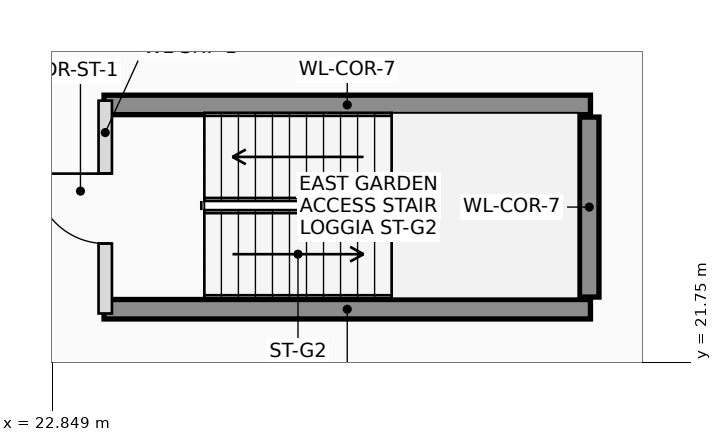
"""IFC4 building model, lengths in metres.
Left out: names, types, materials, properties, quantities, classifications, styles, units other than length and angle.
Written with IfcOpenShell. Run it as: python <this file> out.ifc"""

import sys

from ifc_helpers import new_model, si_unit, direction, frame, frame_2d, origin, place, context, subcontext, project, spatial, rectangle, extrude, element, fill, save


model = new_model("IFC4")
c1 = context("Model", 3, precision=1e-05, world=origin(), true_north=direction((0.0, 1.0)))
c2 = subcontext(c1, "Body", "Model", "MODEL_VIEW")
j1 = project(units=[si_unit("LENGTHUNIT", "METRE"), si_unit("PLANEANGLEUNIT", "RADIAN")], contexts=[c1])
p1 = place(None, origin())
s1 = spatial("IfcSite", under=j1, at=p1, CompositionType="ELEMENT")
p2 = place(p1, origin())
s2 = spatial("IfcBuilding", under=s1, at=p2, CompositionType="ELEMENT")
p3 = place(p2, frame((0.0, 0.0, 8.4)))
s3 = spatial("IfcBuildingStorey", under=s2, at=p3, CompositionType="ELEMENT", Elevation=8.4)
for number, where, z_axis, x_axis in (
    (1, (23.7, 25.98, 0.0), (0.0, 0.0, 1.0), (1.0, 0.0, 0.0)),
    (2, (23.7, 22.62, 0.0), (0.0, 0.0, 1.0), (1.0, 0.0, 0.0)),
):
    element("IfcWall", number, at=place(p3, frame(where, z_axis=z_axis, x_axis=x_axis)), inside=s3, PredefinedType="SHEAR", context=c2, shape_type="SweptSolid", body=[
        extrude(rectangle(XDim=8.0, YDim=0.32, at=frame_2d((4.0, 0.0))), origin(), (0.0, 0.0, 1.0), 3.9),
    ])
p4 = place(p3, frame((31.68, 22.82, 0.0), z_axis=(0.0, 0.0, 1.0), x_axis=(0.0, 1.0, 0.0)))
e3 = element("IfcWall", 3, at=p4, inside=s3, PredefinedType="SHEAR", context=c2, shape_type="SweptSolid", body=[
    extrude(rectangle(XDim=2.96, YDim=0.32, at=frame_2d((1.48, 0.0))), origin(), (0.0, 0.0, 1.0), 3.9),
])
p5 = place(p3, frame((23.72, 22.55, 0.0), z_axis=(0.0, 0.0, 1.0), x_axis=(0.0, 1.0, 0.0)))
e4 = element("IfcWall", 4, at=p5, inside=s3, PredefinedType="PLUMBINGWALL", context=c2, shape_type="SweptSolid", body=[
    extrude(rectangle(XDim=3.5, YDim=0.22, at=frame_2d((1.75, 0.0))), origin(), (0.0, 0.0, 1.0), 3.57),
])
p6 = place(p5, frame((1.15, 0.0, 0.0)))
e5 = element("IfcOpeningElement", 5, at=p6, cuts=e4, PredefinedType="OPENING", context=c2, shape_type="SweptSolid", body=[
    extrude(rectangle(XDim=1.15, YDim=2.15, at=frame_2d((0.575, 1.075))), frame((0.0, 0.12, 0.0), z_axis=(0.0, -1.0, 0.0), x_axis=(1.0, 0.0, 0.0)), (0.0, 0.0, 1.0), 0.24),
])
p7 = place(p6, origin())
e6 = element("IfcDoor", 6, at=p7, inside=s3, OperationType="SINGLE_SWING_RIGHT", PredefinedType="DOOR", context=c2, shape_type="SweptSolid", body=[
    extrude(rectangle(XDim=1.15, YDim=2.15, at=frame_2d((0.575, 1.075))), frame((0.0, 0.025, 0.0), z_axis=(0.0, -1.0, 0.0), x_axis=(1.0, 0.0, 0.0)), (0.0, 0.0, 1.0), 0.05),
])
fill(e5, e6)
save(model, sys.argv[1])
